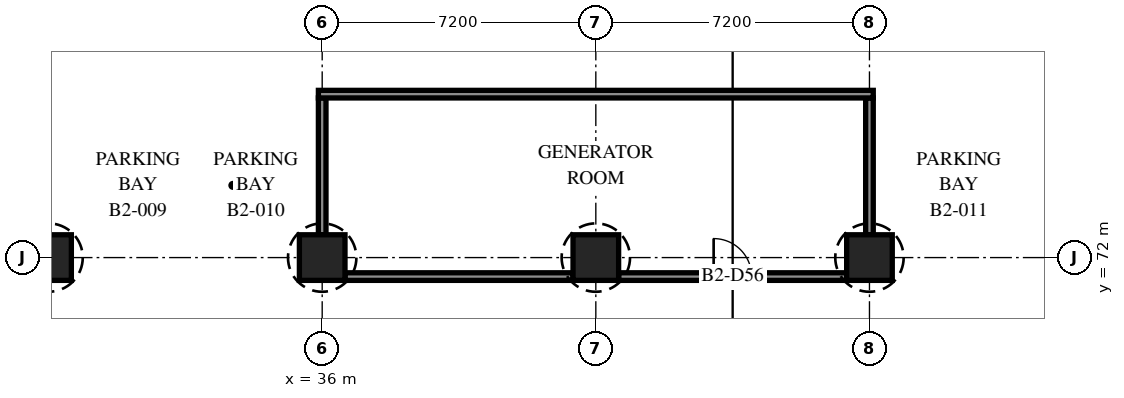
"""IFC4 building model, lengths in metres.
Left out: names, types, materials, properties, quantities, classifications, styles, units other than length and angle.
Written with IfcOpenShell. Run it as: python <this file> out.ifc"""

import sys

from ifc_helpers import new_model, si_unit, direction, frame, frame_2d, origin, origin_2d, place, context, subcontext, project, spatial, rectangle, extrude, element, fill, save


model = new_model("IFC4")
c1 = context("Model", 3, precision=1e-05, world=origin(), true_north=direction((0.0, 1.0)))
c2 = subcontext(c1, "Body", "Model", "MODEL_VIEW")
j1 = project(units=[si_unit("LENGTHUNIT", "METRE"), si_unit("PLANEANGLEUNIT", "RADIAN")], contexts=[c1])
p1 = place(None, origin())
s1 = spatial("IfcSite", under=j1, at=p1, CompositionType="ELEMENT")
p2 = place(p1, origin())
s2 = spatial("IfcBuilding", under=s1, at=p2, CompositionType="ELEMENT")
p3 = place(p2, frame((0.0, 0.0, -9.0)))
s3 = spatial("IfcBuildingStorey", under=s2, at=p3, CompositionType="ELEMENT", Elevation=-9.0)
for number, where, z_axis, x_axis in (
    (1, (28.8, 72.0, 0.0), (0.0, 0.0, 1.0), (1.0, 0.0, 0.0)),
    (2, (36.0, 72.0, 0.0), (0.0, 0.0, 1.0), (1.0, 0.0, 0.0)),
    (3, (43.2, 72.0, 0.0), (0.0, 0.0, 1.0), (1.0, 0.0, 0.0)),
    (4, (50.4, 72.0, 0.0), (0.0, 0.0, 1.0), (1.0, 0.0, 0.0)),
):
    element("IfcColumn", number, at=place(p3, frame(where, z_axis=z_axis, x_axis=x_axis)), inside=s3, PredefinedType="COLUMN", context=c2, shape_type="SweptSolid", body=[
        extrude(rectangle(XDim=1.2, YDim=1.2, at=origin_2d()), origin(), (0.0, 0.0, 1.0), 4.2),
    ])
for number, where, z_axis, x_axis in (
    (5, (36.0, 72.6, 0.0), (0.0, 0.0, 1.0), (0.0, 1.0, 0.0)),
    (6, (50.4, 72.6, 0.0), (0.0, 0.0, 1.0), (0.0, 1.0, 0.0)),
):
    element("IfcWall", number, at=place(p3, frame(where, z_axis=z_axis, x_axis=x_axis)), inside=s3, PredefinedType="PARTITIONING", context=c2, shape_type="SweptSolid", body=[
        extrude(rectangle(XDim=3.6, YDim=0.2, at=frame_2d((1.8, 0.0))), origin(), (0.0, 0.0, 1.0), 4.2),
    ])
p4 = place(p3, frame((36.6, 71.5, 0.0), z_axis=(0.0, 0.0, 1.0), x_axis=(1.0, 0.0, 0.0)))
e7 = element("IfcWall", 7, at=p4, inside=s3, PredefinedType="PARTITIONING", context=c2, shape_type="SweptSolid", body=[
    extrude(rectangle(XDim=6.0, YDim=0.2, at=frame_2d((3.0, 0.0))), origin(), (0.0, 0.0, 1.0), 4.2),
])
p5 = place(p3, frame((43.8, 71.5, 0.0), z_axis=(0.0, 0.0, 1.0), x_axis=(1.0, 0.0, 0.0)))
e8 = element("IfcWall", 8, at=p5, inside=s3, PredefinedType="PARTITIONING", context=c2, shape_type="SweptSolid", body=[
    extrude(rectangle(XDim=6.0, YDim=0.2, at=frame_2d((3.0, 0.0))), origin(), (0.0, 0.0, 1.0), 4.2),
])
p6 = place(p5, frame((2.5, 0.0, 0.0)))
e9 = element("IfcOpeningElement", 9, at=p6, cuts=e8, PredefinedType="OPENING", context=c2, shape_type="SweptSolid", body=[
    extrude(rectangle(XDim=1.0, YDim=2.1, at=frame_2d((0.5, 1.05))), frame((0.0, 0.11, 0.0), z_axis=(0.0, -1.0, 0.0), x_axis=(1.0, 0.0, 0.0)), (0.0, 0.0, 1.0), 0.22),
])
p7 = place(p3, frame((35.9, 76.3, 0.0), z_axis=(0.0, 0.0, 1.0), x_axis=(1.0, 0.0, 0.0)))
e10 = element("IfcWall", 10, at=p7, inside=s3, PredefinedType="PARTITIONING", context=c2, shape_type="SweptSolid", body=[
    extrude(rectangle(XDim=14.6, YDim=0.2, at=frame_2d((7.3, 0.0))), origin(), (0.0, 0.0, 1.0), 4.2),
])
p8 = place(p6, origin())
e11 = element("IfcDoor", 11, at=p8, inside=s3, OperationType="SINGLE_SWING_LEFT", PredefinedType="DOOR", context=c2, shape_type="SweptSolid", body=[
    extrude(rectangle(XDim=1.0, YDim=2.1, at=frame_2d((0.5, 1.05))), frame((0.0, 0.025, 0.0), z_axis=(0.0, -1.0, 0.0), x_axis=(1.0, 0.0, 0.0)), (0.0, 0.0, 1.0), 0.05),
])
fill(e9, e11)
save(model, sys.argv[1])
